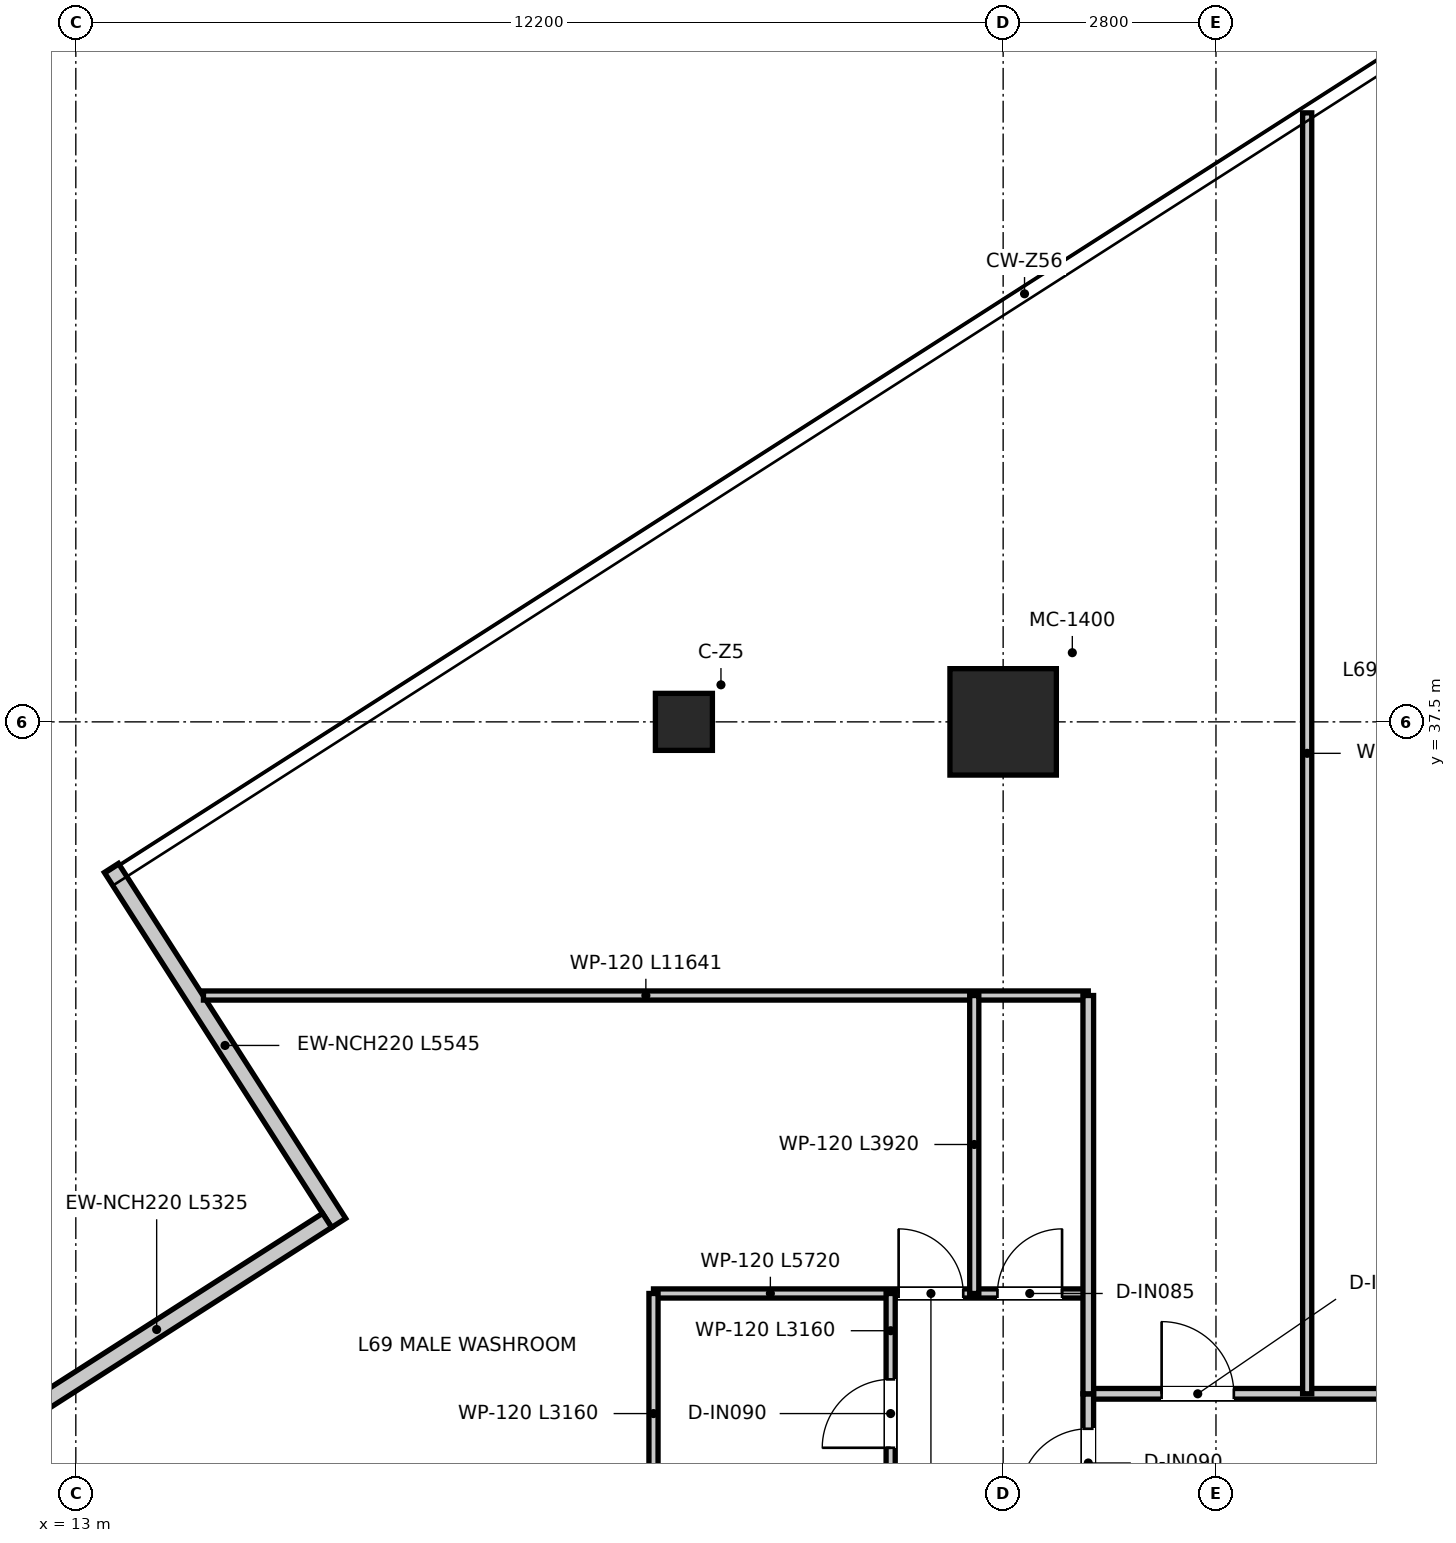
"""IFC4 building model, lengths in metres.
Left out: names, types, materials, properties, quantities, classifications, styles, units other than length and angle.
Written with IfcOpenShell. Run it as: python <this file> out.ifc"""

import sys

from ifc_helpers import new_model, si_unit, direction, frame, frame_2d, origin, origin_2d, place, context, subcontext, project, spatial, rectangle, extrude, source, transform, mapped, element, fill, save


model = new_model("IFC4")
c1 = context("Model", 3, precision=1e-05, world=origin(), true_north=direction((0.0, 1.0)))
c2 = subcontext(c1, "Body", "Model", "MODEL_VIEW")
j1 = project(units=[si_unit("LENGTHUNIT", "METRE"), si_unit("PLANEANGLEUNIT", "RADIAN")], contexts=[c1])
p1 = place(None, origin())
s1 = spatial("IfcSite", under=j1, at=p1, CompositionType="ELEMENT")
p2 = place(p1, origin())
s2 = spatial("IfcBuilding", under=s1, at=p2, CompositionType="ELEMENT")
p3 = place(p2, frame((0.0, 0.0, 283.2)))
s3 = spatial("IfcBuildingStorey", under=s2, at=p3, CompositionType="ELEMENT", Elevation=283.2)
m1 = source(origin(), c2, "Body", "SweptSolid", [
    extrude(rectangle(XDim=1.4, YDim=1.4, at=origin_2d()), origin(), (0.0, 0.0, 1.0), 3.95),
])
p4 = place(p3, frame((25.2, 37.5, 0.0), z_axis=(0.0, 0.0, 1.0), x_axis=(1.0, 0.0, 0.0)))
e1 = element("IfcColumn", 1, at=p4, inside=s3, PredefinedType="USERDEFINED", context=c2, shape_type="MappedRepresentation", body=[
    mapped(m1, transform((0.0, 0.0, 0.0), x_axis=(1.0, 0.0, 0.0), y_axis=(0.0, 1.0, 0.0), z_axis=(0.0, 0.0, 1.0), scale=1.0)),
])
m2 = source(origin(), c2, "Body", "SweptSolid", [
    extrude(rectangle(XDim=0.75, YDim=0.75, at=origin_2d()), origin(), (0.0, 0.0, 1.0), 3.95),
])
p5 = place(p3, frame((21.0, 37.5, 0.0), z_axis=(0.0, 0.0, 1.0), x_axis=(1.0, 0.0, 0.0)))
e2 = element("IfcColumn", 2, at=p5, inside=s3, PredefinedType="COLUMN", context=c2, shape_type="MappedRepresentation", body=[
    mapped(m2, transform((0.0, 0.0, 0.0), x_axis=(1.0, 0.0, 0.0), y_axis=(0.0, 1.0, 0.0), z_axis=(0.0, 0.0, 1.0), scale=1.0)),
])
p6 = place(p3, frame((13.468, 35.578, 0.0), z_axis=(0.0, 0.0, 1.0), x_axis=(0.539129907131, -0.842222620948, 0.0)))
e3 = element("IfcWall", 3, at=p6, inside=s3, PredefinedType="ELEMENTEDWALL", context=c2, shape_type="SweptSolid", body=[
    extrude(rectangle(XDim=5.545, YDim=0.22, at=frame_2d((2.772, 0.0))), origin(), (0.0, 0.0, 1.0), 3.67),
])
p7 = place(p3, frame((16.306, 30.941, 0.0), z_axis=(0.0, 0.0, 1.0), x_axis=(-0.84222560178, -0.539125250481, 0.0)))
e4 = element("IfcWall", 4, at=p7, inside=s3, PredefinedType="ELEMENTEDWALL", context=c2, shape_type="SweptSolid", body=[
    extrude(rectangle(XDim=5.325, YDim=0.22, at=frame_2d((2.663, 0.0))), origin(), (0.0, 0.0, 1.0), 3.67),
])
p8 = place(p3, frame((26.32, 28.66, 0.0), z_axis=(0.0, 0.0, 1.0), x_axis=(1.0, 0.0, 0.0)))
e5 = element("IfcWall", 5, at=p8, inside=s3, PredefinedType="PARTITIONING", context=c2, shape_type="SweptSolid", body=[
    extrude(rectangle(XDim=19.36, YDim=0.14, at=frame_2d((9.68, 0.0))), origin(), (0.0, 0.0, 1.0), 3.18),
])
p9 = place(p8, frame((0.965, 0.0, 0.0)))
e6 = element("IfcOpeningElement", 6, at=p9, cuts=e5, PredefinedType="OPENING", context=c2, shape_type="SweptSolid", body=[
    extrude(rectangle(XDim=0.95, YDim=2.1, at=frame_2d((0.475, 1.05))), frame((0.0, 0.08, 0.0), z_axis=(0.0, -1.0, 0.0), x_axis=(1.0, 0.0, 0.0)), (0.0, 0.0, 1.0), 0.16),
])
p10 = place(p8, frame((4.705, 0.0, 0.0)))
e7 = element("IfcOpeningElement", 7, at=p10, cuts=e5, PredefinedType="OPENING", context=c2, shape_type="SweptSolid", body=[
    extrude(rectangle(XDim=0.95, YDim=2.1, at=frame_2d((0.475, 1.05))), frame((0.0, 0.08, 0.0), z_axis=(0.0, -1.0, 0.0), x_axis=(1.0, 0.0, 0.0)), (0.0, 0.0, 1.0), 0.16),
])
p11 = place(p8, frame((9.305, 0.0, 0.0)))
e8 = element("IfcOpeningElement", 8, at=p11, cuts=e5, PredefinedType="OPENING", context=c2, shape_type="SweptSolid", body=[
    extrude(rectangle(XDim=0.95, YDim=2.1, at=frame_2d((0.475, 1.05))), frame((0.0, 0.08, 0.0), z_axis=(0.0, -1.0, 0.0), x_axis=(1.0, 0.0, 0.0)), (0.0, 0.0, 1.0), 0.16),
])
p12 = place(p8, frame((13.805, 0.0, 0.0)))
e9 = element("IfcOpeningElement", 9, at=p12, cuts=e5, PredefinedType="OPENING", context=c2, shape_type="SweptSolid", body=[
    extrude(rectangle(XDim=0.95, YDim=2.1, at=frame_2d((0.475, 1.05))), frame((0.0, 0.08, 0.0), z_axis=(0.0, -1.0, 0.0), x_axis=(1.0, 0.0, 0.0)), (0.0, 0.0, 1.0), 0.16),
])
p13 = place(p8, frame((17.445, 0.0, 0.0)))
e10 = element("IfcOpeningElement", 10, at=p13, cuts=e5, PredefinedType="OPENING", context=c2, shape_type="SweptSolid", body=[
    extrude(rectangle(XDim=0.95, YDim=2.1, at=frame_2d((0.475, 1.05))), frame((0.0, 0.08, 0.0), z_axis=(0.0, -1.0, 0.0), x_axis=(1.0, 0.0, 0.0)), (0.0, 0.0, 1.0), 0.16),
])
p14 = place(p3, frame((26.32, 9.0, 0.0), z_axis=(0.0, 0.0, 1.0), x_axis=(0.0, 1.0, 0.0)))
e11 = element("IfcWall", 11, at=p14, inside=s3, PredefinedType="PARTITIONING", context=c2, shape_type="SweptSolid", body=[
    extrude(rectangle(XDim=19.66, YDim=0.14, at=frame_2d((9.83, 0.0))), origin(), (0.0, 0.0, 1.0), 3.13),
])
p15 = place(p14, frame((18.3, 0.0, 0.0)))
e12 = element("IfcOpeningElement", 12, at=p15, cuts=e11, PredefinedType="OPENING", context=c2, shape_type="SweptSolid", body=[
    extrude(rectangle(XDim=0.9, YDim=2.1, at=frame_2d((0.45, 1.05))), frame((0.0, 0.08, 0.0), z_axis=(0.0, -1.0, 0.0), x_axis=(1.0, 0.0, 0.0)), (0.0, 0.0, 1.0), 0.16),
])
p16 = place(p14, frame((12.71, 0.0, 0.0)))
e13 = element("IfcOpeningElement", 13, at=p16, cuts=e11, PredefinedType="OPENING", context=c2, shape_type="SweptSolid", body=[
    extrude(rectangle(XDim=0.9, YDim=2.1, at=frame_2d((0.45, 1.05))), frame((0.0, 0.08, 0.0), z_axis=(0.0, -1.0, 0.0), x_axis=(1.0, 0.0, 0.0)), (0.0, 0.0, 1.0), 0.16),
])
p17 = place(p3, frame((14.679, 33.9, 0.0), z_axis=(0.0, 0.0, 1.0), x_axis=(1.0, 0.0, 0.0)))
e14 = element("IfcWall", 14, at=p17, inside=s3, PredefinedType="PARTITIONING", context=c2, shape_type="SweptSolid", body=[
    extrude(rectangle(XDim=11.641, YDim=0.12, at=frame_2d((5.82, 0.0))), origin(), (0.0, 0.0, 1.0), 3.13),
])
p18 = place(p3, frame((20.6, 29.98, 0.0), z_axis=(0.0, 0.0, 1.0), x_axis=(1.0, 0.0, 0.0)))
e15 = element("IfcWall", 15, at=p18, inside=s3, PredefinedType="PARTITIONING", context=c2, shape_type="SweptSolid", body=[
    extrude(rectangle(XDim=5.72, YDim=0.12, at=frame_2d((2.86, 0.0))), origin(), (0.0, 0.0, 1.0), 3.13),
])
p19 = place(p18, frame((3.225, 0.0, 0.0)))
e16 = element("IfcOpeningElement", 16, at=p19, cuts=e15, PredefinedType="OPENING", context=c2, shape_type="SweptSolid", body=[
    extrude(rectangle(XDim=0.85, YDim=2.1, at=frame_2d((0.425, 1.05))), frame((0.0, 0.07, 0.0), z_axis=(0.0, -1.0, 0.0), x_axis=(1.0, 0.0, 0.0)), (0.0, 0.0, 1.0), 0.14),
])
p20 = place(p18, frame((4.525, 0.0, 0.0)))
e17 = element("IfcOpeningElement", 17, at=p20, cuts=e15, PredefinedType="OPENING", context=c2, shape_type="SweptSolid", body=[
    extrude(rectangle(XDim=0.85, YDim=2.1, at=frame_2d((0.425, 1.05))), frame((0.0, 0.07, 0.0), z_axis=(0.0, -1.0, 0.0), x_axis=(1.0, 0.0, 0.0)), (0.0, 0.0, 1.0), 0.14),
])
p21 = place(p3, frame((20.6, 26.82, 0.0), z_axis=(0.0, 0.0, 1.0), x_axis=(0.0, 1.0, 0.0)))
e18 = element("IfcWall", 18, at=p21, inside=s3, PredefinedType="PARTITIONING", context=c2, shape_type="SweptSolid", body=[
    extrude(rectangle(XDim=3.16, YDim=0.12, at=frame_2d((1.58, 0.0))), origin(), (0.0, 0.0, 1.0), 3.67),
])
p22 = place(p3, frame((23.72, 26.82, 0.0), z_axis=(0.0, 0.0, 1.0), x_axis=(0.0, 1.0, 0.0)))
e19 = element("IfcWall", 19, at=p22, inside=s3, PredefinedType="PARTITIONING", context=c2, shape_type="SweptSolid", body=[
    extrude(rectangle(XDim=3.16, YDim=0.12, at=frame_2d((1.58, 0.0))), origin(), (0.0, 0.0, 1.0), 3.18),
])
p23 = place(p22, frame((1.13, 0.0, 0.0)))
e20 = element("IfcOpeningElement", 20, at=p23, cuts=e19, PredefinedType="OPENING", context=c2, shape_type="SweptSolid", body=[
    extrude(rectangle(XDim=0.9, YDim=2.1, at=frame_2d((0.45, 1.05))), frame((0.0, 0.07, 0.0), z_axis=(0.0, -1.0, 0.0), x_axis=(1.0, 0.0, 0.0)), (0.0, 0.0, 1.0), 0.14),
])
p24 = place(p3, frame((24.82, 29.98, 0.0), z_axis=(0.0, 0.0, 1.0), x_axis=(0.0, 1.0, 0.0)))
e21 = element("IfcWall", 21, at=p24, inside=s3, PredefinedType="PARTITIONING", context=c2, shape_type="SweptSolid", body=[
    extrude(rectangle(XDim=3.92, YDim=0.12, at=frame_2d((1.96, 0.0))), origin(), (0.0, 0.0, 1.0), 3.31),
])
p25 = place(p3, frame((26.32, 28.66, 0.0), z_axis=(0.0, 0.0, 1.0), x_axis=(0.0, 1.0, 0.0)))
e22 = element("IfcWall", 22, at=p25, inside=s3, PredefinedType="PARTITIONING", context=c2, shape_type="SweptSolid", body=[
    extrude(rectangle(XDim=5.24, YDim=0.14, at=frame_2d((2.62, 0.0))), origin(), (0.0, 0.0, 1.0), 3.43),
])
p26 = place(p3, frame((29.2, 28.66, 0.0), z_axis=(0.0, 0.0, 1.0), x_axis=(0.0, 1.0, 0.0)))
e23 = element("IfcWall", 23, at=p26, inside=s3, PredefinedType="PARTITIONING", context=c2, shape_type="SweptSolid", body=[
    extrude(rectangle(XDim=16.852, YDim=0.12, at=frame_2d((8.426, 0.0))), origin(), (0.0, 0.0, 1.0), 3.13),
])
p27 = place(p15, origin())
e24 = element("IfcDoor", 24, at=p27, inside=s3, OperationType="SINGLE_SWING_LEFT", PredefinedType="DOOR", context=c2, shape_type="SweptSolid", body=[
    extrude(rectangle(XDim=0.9, YDim=2.1, at=frame_2d((0.45, 1.05))), frame((0.0, 0.025, 0.0), z_axis=(0.0, -1.0, 0.0), x_axis=(1.0, 0.0, 0.0)), (0.0, 0.0, 1.0), 0.05),
])
fill(e12, e24)
p28 = place(p19, origin())
e25 = element("IfcDoor", 25, at=p28, inside=s3, OperationType="SINGLE_SWING_LEFT", PredefinedType="DOOR", context=c2, shape_type="SweptSolid", body=[
    extrude(rectangle(XDim=0.85, YDim=2.1, at=frame_2d((0.425, 1.05))), frame((0.0, 0.025, 0.0), z_axis=(0.0, -1.0, 0.0), x_axis=(1.0, 0.0, 0.0)), (0.0, 0.0, 1.0), 0.05),
])
fill(e16, e25)
p29 = place(p20, origin())
e26 = element("IfcDoor", 26, at=p29, inside=s3, OperationType="SINGLE_SWING_RIGHT", PredefinedType="DOOR", context=c2, shape_type="SweptSolid", body=[
    extrude(rectangle(XDim=0.85, YDim=2.1, at=frame_2d((0.425, 1.05))), frame((0.0, 0.025, 0.0), z_axis=(0.0, -1.0, 0.0), x_axis=(1.0, 0.0, 0.0)), (0.0, 0.0, 1.0), 0.05),
])
fill(e17, e26)
p30 = place(p23, origin())
e27 = element("IfcDoor", 27, at=p30, inside=s3, OperationType="SINGLE_SWING_LEFT", PredefinedType="DOOR", context=c2, shape_type="SweptSolid", body=[
    extrude(rectangle(XDim=0.9, YDim=2.1, at=frame_2d((0.45, 1.05))), frame((0.0, 0.025, 0.0), z_axis=(0.0, -1.0, 0.0), x_axis=(1.0, 0.0, 0.0)), (0.0, 0.0, 1.0), 0.05),
])
fill(e20, e27)
p31 = place(p9, origin())
e28 = element("IfcDoor", 28, at=p31, inside=s3, OperationType="SINGLE_SWING_LEFT", PredefinedType="DOOR", context=c2, shape_type="SweptSolid", body=[
    extrude(rectangle(XDim=0.95, YDim=2.1, at=frame_2d((0.475, 1.05))), frame((0.0, 0.025, 0.0), z_axis=(0.0, -1.0, 0.0), x_axis=(1.0, 0.0, 0.0)), (0.0, 0.0, 1.0), 0.05),
])
fill(e6, e28)
save(model, sys.argv[1])
